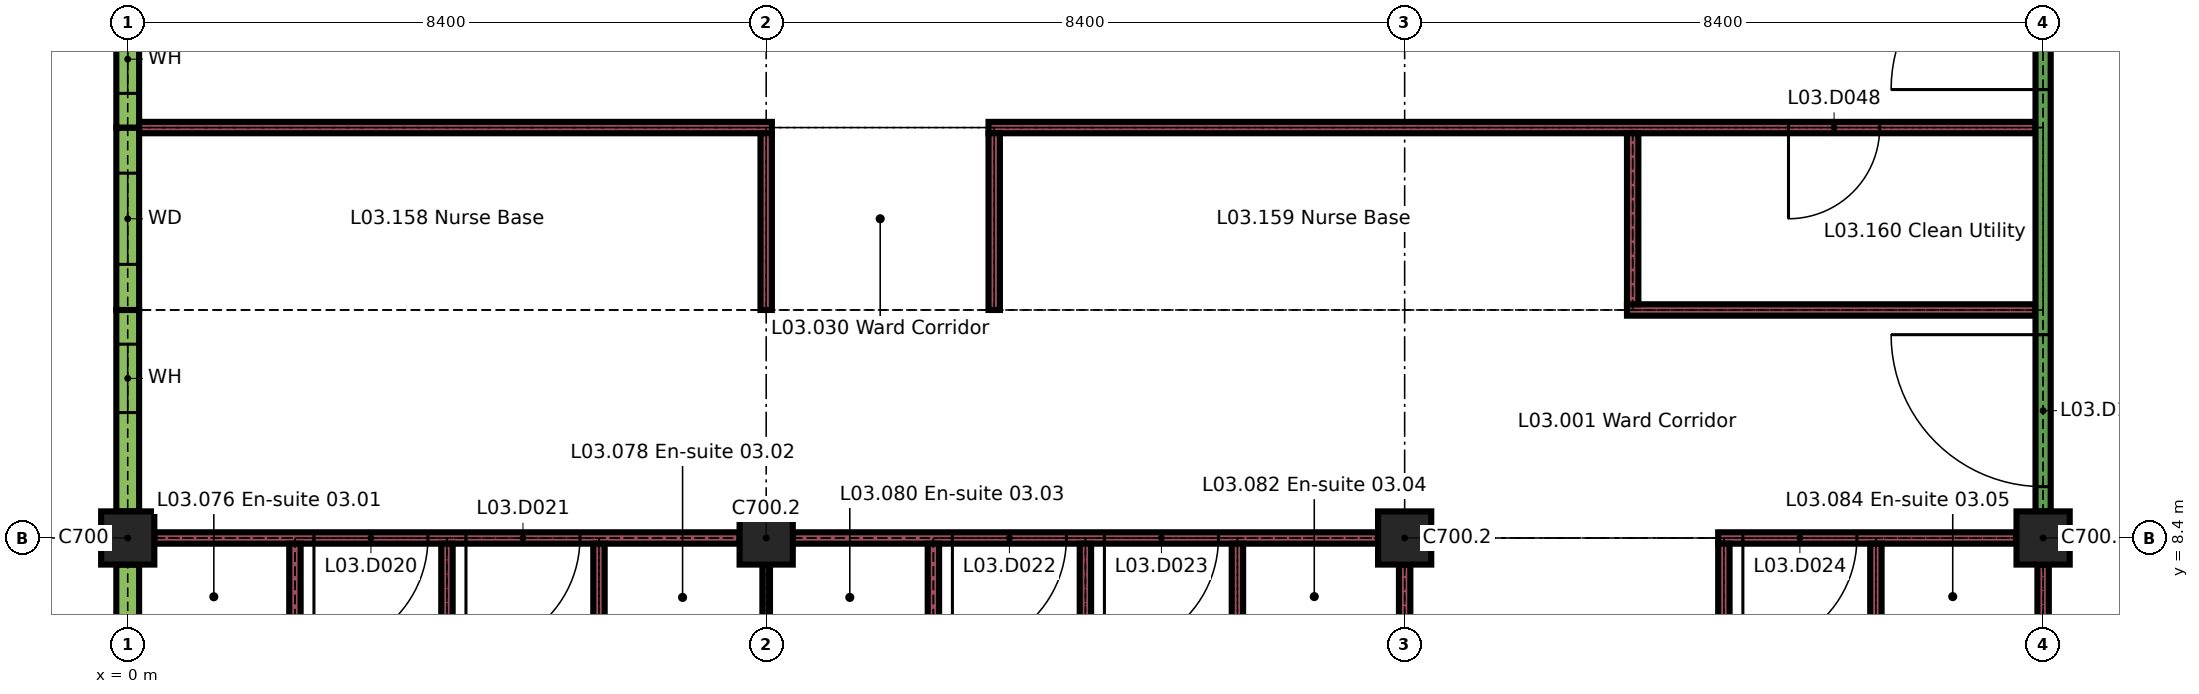
"""IFC4 building model, lengths in metres.
Left out: names, types, materials, properties, quantities, classifications, styles, units other than length and angle.
Written with IfcOpenShell. Run it as: python <this file> out.ifc"""

import sys

from ifc_helpers import new_model, si_unit, direction, frame, frame_2d, origin, origin_2d, place, context, subcontext, project, spatial, rectangle, extrude, element, fill, save


model = new_model("IFC4")
c1 = context("Model", 3, precision=1e-05, world=origin(), true_north=direction((0.0, 1.0)))
c2 = subcontext(c1, "Body", "Model", "MODEL_VIEW")
j1 = project(units=[si_unit("LENGTHUNIT", "METRE"), si_unit("PLANEANGLEUNIT", "RADIAN")], contexts=[c1])
p1 = place(None, origin())
s1 = spatial("IfcSite", under=j1, at=p1, CompositionType="ELEMENT")
p2 = place(p1, origin())
s2 = spatial("IfcBuilding", under=s1, at=p2, CompositionType="ELEMENT")
p3 = place(p2, frame((0.0, 0.0, 15.3)))
s3 = spatial("IfcBuildingStorey", under=s2, at=p3, CompositionType="ELEMENT", Elevation=15.3)
for number, where, z_axis, x_axis in (
    (1, (0.0, 8.4, 0.0), (0.0, 0.0, 1.0), (1.0, 0.0, 0.0)),
    (2, (8.4, 8.4, 0.0), (0.0, 0.0, 1.0), (1.0, 0.0, 0.0)),
    (3, (16.8, 8.4, 0.0), (0.0, 0.0, 1.0), (1.0, 0.0, 0.0)),
    (4, (25.2, 8.4, 0.0), (0.0, 0.0, 1.0), (1.0, 0.0, 0.0)),
):
    element("IfcColumn", number, at=place(p3, frame(where, z_axis=z_axis, x_axis=x_axis)), inside=s3, PredefinedType="COLUMN", context=c2, shape_type="SweptSolid", body=[
        extrude(rectangle(XDim=0.7, YDim=0.7, at=origin_2d()), origin(), (0.0, 0.0, 1.0), 3.26),
    ])
p4 = place(p3, frame((0.0, 6.0, 0.0), z_axis=(0.0, 0.0, 1.0), x_axis=(0.0, 1.0, 0.0)))
e5 = element("IfcWall", 5, at=p4, inside=s3, PredefinedType="SOLIDWALL", context=c2, shape_type="SweptSolid", body=[
    extrude(rectangle(XDim=2.05, YDim=0.3, at=frame_2d((1.025, 0.0))), origin(), (0.0, 0.0, 1.0), 2.96),
])
p5 = place(p3, frame((0.0, 8.75, 0.0), z_axis=(0.0, 0.0, 1.0), x_axis=(0.0, 1.0, 0.0)))
e6 = element("IfcWall", 6, at=p5, inside=s3, PredefinedType="SOLIDWALL", context=c2, shape_type="SweptSolid", body=[
    extrude(rectangle(XDim=2.65, YDim=0.3, at=frame_2d((1.325, 0.0))), origin(), (0.0, 0.0, 1.0), 2.96),
])
p6 = place(p5, frame((1.3, 0.0, 0.9)))
e7 = element("IfcOpeningElement", 7, at=p6, cuts=e6, PredefinedType="OPENING", context=c2, shape_type="SweptSolid", body=[
    extrude(rectangle(XDim=0.9, YDim=1.5, at=frame_2d((0.45, 0.75))), frame((0.0, 0.16, 0.0), z_axis=(0.0, -1.0, 0.0), x_axis=(1.0, 0.0, 0.0)), (0.0, 0.0, 1.0), 0.32),
])
p7 = place(p3, frame((0.0, 11.4, 0.0), z_axis=(0.0, 0.0, 1.0), x_axis=(0.0, 1.0, 0.0)))
e8 = element("IfcWall", 8, at=p7, inside=s3, PredefinedType="SOLIDWALL", context=c2, shape_type="SweptSolid", body=[
    extrude(rectangle(XDim=2.4, YDim=0.3, at=frame_2d((1.2, 0.0))), origin(), (0.0, 0.0, 1.0), 2.96),
])
p8 = place(p7, frame((0.6, 0.0, 0.9)))
e9 = element("IfcOpeningElement", 9, at=p8, cuts=e8, PredefinedType="OPENING", context=c2, shape_type="SweptSolid", body=[
    extrude(rectangle(XDim=1.2, YDim=1.5, at=frame_2d((0.6, 0.75))), frame((0.0, 0.16, 0.0), z_axis=(0.0, -1.0, 0.0), x_axis=(1.0, 0.0, 0.0)), (0.0, 0.0, 1.0), 0.32),
])
p9 = place(p3, frame((0.0, 13.8, 0.0), z_axis=(0.0, 0.0, 1.0), x_axis=(0.0, 1.0, 0.0)))
e10 = element("IfcWall", 10, at=p9, inside=s3, PredefinedType="SOLIDWALL", context=c2, shape_type="SweptSolid", body=[
    extrude(rectangle(XDim=3.0, YDim=0.3, at=frame_2d((1.5, 0.0))), origin(), (0.0, 0.0, 1.0), 2.96),
])
p10 = place(p9, frame((0.45, 0.0, 0.9)))
e11 = element("IfcOpeningElement", 11, at=p10, cuts=e10, PredefinedType="OPENING", context=c2, shape_type="SweptSolid", body=[
    extrude(rectangle(XDim=0.9, YDim=1.5, at=frame_2d((0.45, 0.75))), frame((0.0, 0.16, 0.0), z_axis=(0.0, -1.0, 0.0), x_axis=(1.0, 0.0, 0.0)), (0.0, 0.0, 1.0), 0.32),
])
p11 = place(p3, frame((0.35, 8.4, 0.0), z_axis=(0.0, 0.0, 1.0), x_axis=(1.0, 0.0, 0.0)))
e12 = element("IfcWall", 12, at=p11, inside=s3, PredefinedType="PARTITIONING", context=c2, shape_type="SweptSolid", body=[
    extrude(rectangle(XDim=7.7, YDim=0.15, at=frame_2d((3.85, 0.0))), origin(), (0.0, 0.0, 1.0), 3.26),
])
p12 = place(p11, frame((2.1, 0.0, 0.0)))
e13 = element("IfcOpeningElement", 13, at=p12, cuts=e12, PredefinedType="OPENING", context=c2, shape_type="SweptSolid", body=[
    extrude(rectangle(XDim=1.5, YDim=2.4, at=frame_2d((0.75, 1.2))), frame((0.0, 0.085, 0.0), z_axis=(0.0, -1.0, 0.0), x_axis=(1.0, 0.0, 0.0)), (0.0, 0.0, 1.0), 0.17),
])
p13 = place(p11, frame((4.1, 0.0, 0.0)))
e14 = element("IfcOpeningElement", 14, at=p13, cuts=e12, PredefinedType="OPENING", context=c2, shape_type="SweptSolid", body=[
    extrude(rectangle(XDim=1.5, YDim=2.4, at=frame_2d((0.75, 1.2))), frame((0.0, 0.085, 0.0), z_axis=(0.0, -1.0, 0.0), x_axis=(1.0, 0.0, 0.0)), (0.0, 0.0, 1.0), 0.17),
])
p14 = place(p3, frame((8.75, 8.4, 0.0), z_axis=(0.0, 0.0, 1.0), x_axis=(1.0, 0.0, 0.0)))
e15 = element("IfcWall", 15, at=p14, inside=s3, PredefinedType="PARTITIONING", context=c2, shape_type="SweptSolid", body=[
    extrude(rectangle(XDim=7.7, YDim=0.15, at=frame_2d((3.85, 0.0))), origin(), (0.0, 0.0, 1.0), 3.26),
])
p15 = place(p14, frame((2.1, 0.0, 0.0)))
e16 = element("IfcOpeningElement", 16, at=p15, cuts=e15, PredefinedType="OPENING", context=c2, shape_type="SweptSolid", body=[
    extrude(rectangle(XDim=1.5, YDim=2.4, at=frame_2d((0.75, 1.2))), frame((0.0, 0.085, 0.0), z_axis=(0.0, -1.0, 0.0), x_axis=(1.0, 0.0, 0.0)), (0.0, 0.0, 1.0), 0.17),
])
p16 = place(p14, frame((4.1, 0.0, 0.0)))
e17 = element("IfcOpeningElement", 17, at=p16, cuts=e15, PredefinedType="OPENING", context=c2, shape_type="SweptSolid", body=[
    extrude(rectangle(XDim=1.5, YDim=2.4, at=frame_2d((0.75, 1.2))), frame((0.0, 0.085, 0.0), z_axis=(0.0, -1.0, 0.0), x_axis=(1.0, 0.0, 0.0)), (0.0, 0.0, 1.0), 0.17),
])
p17 = place(p3, frame((20.925, 8.4, 0.0), z_axis=(0.0, 0.0, 1.0), x_axis=(1.0, 0.0, 0.0)))
e18 = element("IfcWall", 18, at=p17, inside=s3, PredefinedType="PARTITIONING", context=c2, shape_type="SweptSolid", body=[
    extrude(rectangle(XDim=3.925, YDim=0.15, at=frame_2d((1.962, 0.0))), origin(), (0.0, 0.0, 1.0), 3.26),
])
p18 = place(p17, frame((0.325, 0.0, 0.0)))
e19 = element("IfcOpeningElement", 19, at=p18, cuts=e18, PredefinedType="OPENING", context=c2, shape_type="SweptSolid", body=[
    extrude(rectangle(XDim=1.5, YDim=2.4, at=frame_2d((0.75, 1.2))), frame((0.0, 0.085, 0.0), z_axis=(0.0, -1.0, 0.0), x_axis=(1.0, 0.0, 0.0)), (0.0, 0.0, 1.0), 0.17),
])
p19 = place(p3, frame((19.725, 11.4, 0.0), z_axis=(0.0, 0.0, 1.0), x_axis=(1.0, 0.0, 0.0)))
e20 = element("IfcWall", 20, at=p19, inside=s3, PredefinedType="PARTITIONING", context=c2, shape_type="SweptSolid", body=[
    extrude(rectangle(XDim=5.375, YDim=0.15, at=frame_2d((2.688, 0.0))), origin(), (0.0, 0.0, 1.0), 3.26),
])
p20 = place(p3, frame((0.15, 13.8, 0.0), z_axis=(0.0, 0.0, 1.0), x_axis=(1.0, 0.0, 0.0)))
e21 = element("IfcWall", 21, at=p20, inside=s3, PredefinedType="PARTITIONING", context=c2, shape_type="SweptSolid", body=[
    extrude(rectangle(XDim=8.325, YDim=0.15, at=frame_2d((4.163, 0.0))), origin(), (0.0, 0.0, 1.0), 3.26),
])
p21 = place(p3, frame((11.325, 13.8, 0.0), z_axis=(0.0, 0.0, 1.0), x_axis=(1.0, 0.0, 0.0)))
e22 = element("IfcWall", 22, at=p21, inside=s3, PredefinedType="PARTITIONING", context=c2, shape_type="SweptSolid", body=[
    extrude(rectangle(XDim=13.775, YDim=0.15, at=frame_2d((6.888, 0.0))), origin(), (0.0, 0.0, 1.0), 3.26),
])
p22 = place(p21, frame((10.525, 0.0, 0.0)))
e23 = element("IfcOpeningElement", 23, at=p22, cuts=e22, PredefinedType="OPENING", context=c2, shape_type="SweptSolid", body=[
    extrude(rectangle(XDim=1.2, YDim=2.1, at=frame_2d((0.6, 1.05))), frame((0.0, 0.085, 0.0), z_axis=(0.0, -1.0, 0.0), x_axis=(1.0, 0.0, 0.0)), (0.0, 0.0, 1.0), 0.17),
])
p23 = place(p3, frame((2.2, 6.075, 0.0), z_axis=(0.0, 0.0, 1.0), x_axis=(0.0, 1.0, 0.0)))
e24 = element("IfcWall", 24, at=p23, inside=s3, PredefinedType="PARTITIONING", context=c2, shape_type="SweptSolid", body=[
    extrude(rectangle(XDim=2.25, YDim=0.15, at=frame_2d((1.125, 0.0))), origin(), (0.0, 0.0, 1.0), 3.26),
])
p24 = place(p3, frame((4.2, 0.15, 0.0), z_axis=(0.0, 0.0, 1.0), x_axis=(0.0, 1.0, 0.0)))
e25 = element("IfcWall", 25, at=p24, inside=s3, PredefinedType="PARTITIONING", context=c2, shape_type="SweptSolid", body=[
    extrude(rectangle(XDim=8.175, YDim=0.15, at=frame_2d((4.087, 0.0))), origin(), (0.0, 0.0, 1.0), 3.26),
])
p25 = place(p3, frame((6.2, 6.075, 0.0), z_axis=(0.0, 0.0, 1.0), x_axis=(0.0, 1.0, 0.0)))
e26 = element("IfcWall", 26, at=p25, inside=s3, PredefinedType="PARTITIONING", context=c2, shape_type="SweptSolid", body=[
    extrude(rectangle(XDim=2.25, YDim=0.15, at=frame_2d((1.125, 0.0))), origin(), (0.0, 0.0, 1.0), 3.26),
])
p26 = place(p3, frame((8.4, 6.075, 0.0), z_axis=(0.0, 0.0, 1.0), x_axis=(0.0, 1.0, 0.0)))
e27 = element("IfcWall", 27, at=p26, inside=s3, PredefinedType="PARTITIONING", context=c2, shape_type="SweptSolid", body=[
    extrude(rectangle(XDim=1.975, YDim=0.1, at=frame_2d((0.988, 0.0))), origin(), (0.0, 0.0, 1.0), 3.26),
])
p27 = place(p3, frame((8.4, 11.4, 0.0), z_axis=(0.0, 0.0, 1.0), x_axis=(0.0, 1.0, 0.0)))
e28 = element("IfcWall", 28, at=p27, inside=s3, PredefinedType="PARTITIONING", context=c2, shape_type="SweptSolid", body=[
    extrude(rectangle(XDim=2.325, YDim=0.15, at=frame_2d((1.163, 0.0))), origin(), (0.0, 0.0, 1.0), 3.26),
])
p28 = place(p3, frame((10.6, 6.075, 0.0), z_axis=(0.0, 0.0, 1.0), x_axis=(0.0, 1.0, 0.0)))
e29 = element("IfcWall", 29, at=p28, inside=s3, PredefinedType="PARTITIONING", context=c2, shape_type="SweptSolid", body=[
    extrude(rectangle(XDim=2.25, YDim=0.15, at=frame_2d((1.125, 0.0))), origin(), (0.0, 0.0, 1.0), 3.26),
])
p29 = place(p3, frame((11.4, 11.4, 0.0), z_axis=(0.0, 0.0, 1.0), x_axis=(0.0, 1.0, 0.0)))
e30 = element("IfcWall", 30, at=p29, inside=s3, PredefinedType="PARTITIONING", context=c2, shape_type="SweptSolid", body=[
    extrude(rectangle(XDim=2.325, YDim=0.15, at=frame_2d((1.163, 0.0))), origin(), (0.0, 0.0, 1.0), 3.26),
])
p30 = place(p3, frame((12.6, 0.15, 0.0), z_axis=(0.0, 0.0, 1.0), x_axis=(0.0, 1.0, 0.0)))
e31 = element("IfcWall", 31, at=p30, inside=s3, PredefinedType="PARTITIONING", context=c2, shape_type="SweptSolid", body=[
    extrude(rectangle(XDim=8.175, YDim=0.15, at=frame_2d((4.087, 0.0))), origin(), (0.0, 0.0, 1.0), 3.26),
])
p31 = place(p3, frame((14.6, 6.075, 0.0), z_axis=(0.0, 0.0, 1.0), x_axis=(0.0, 1.0, 0.0)))
e32 = element("IfcWall", 32, at=p31, inside=s3, PredefinedType="PARTITIONING", context=c2, shape_type="SweptSolid", body=[
    extrude(rectangle(XDim=2.25, YDim=0.15, at=frame_2d((1.125, 0.0))), origin(), (0.0, 0.0, 1.0), 3.26),
])
p32 = place(p3, frame((16.8, 0.35, 0.0), z_axis=(0.0, 0.0, 1.0), x_axis=(0.0, 1.0, 0.0)))
e33 = element("IfcWall", 33, at=p32, inside=s3, PredefinedType="PARTITIONING", context=c2, shape_type="SweptSolid", body=[
    extrude(rectangle(XDim=7.7, YDim=0.15, at=frame_2d((3.85, 0.0))), origin(), (0.0, 0.0, 1.0), 3.26),
])
p33 = place(p3, frame((19.8, 11.475, 0.0), z_axis=(0.0, 0.0, 1.0), x_axis=(0.0, 1.0, 0.0)))
e34 = element("IfcWall", 34, at=p33, inside=s3, PredefinedType="PARTITIONING", context=c2, shape_type="SweptSolid", body=[
    extrude(rectangle(XDim=2.25, YDim=0.15, at=frame_2d((1.125, 0.0))), origin(), (0.0, 0.0, 1.0), 3.26),
])
p34 = place(p3, frame((21.0, 0.15, 0.0), z_axis=(0.0, 0.0, 1.0), x_axis=(0.0, 1.0, 0.0)))
e35 = element("IfcWall", 35, at=p34, inside=s3, PredefinedType="PARTITIONING", context=c2, shape_type="SweptSolid", body=[
    extrude(rectangle(XDim=8.175, YDim=0.15, at=frame_2d((4.087, 0.0))), origin(), (0.0, 0.0, 1.0), 3.26),
])
p35 = place(p3, frame((23.0, 6.075, 0.0), z_axis=(0.0, 0.0, 1.0), x_axis=(0.0, 1.0, 0.0)))
e36 = element("IfcWall", 36, at=p35, inside=s3, PredefinedType="PARTITIONING", context=c2, shape_type="SweptSolid", body=[
    extrude(rectangle(XDim=2.25, YDim=0.15, at=frame_2d((1.125, 0.0))), origin(), (0.0, 0.0, 1.0), 3.26),
])
p36 = place(p3, frame((25.2, 0.35, 0.0), z_axis=(0.0, 0.0, 1.0), x_axis=(0.0, 1.0, 0.0)))
e37 = element("IfcWall", 37, at=p36, inside=s3, PredefinedType="PARTITIONING", context=c2, shape_type="SweptSolid", body=[
    extrude(rectangle(XDim=7.7, YDim=0.15, at=frame_2d((3.85, 0.0))), origin(), (0.0, 0.0, 1.0), 3.26),
])
p37 = place(p3, frame((25.2, 8.75, 0.0), z_axis=(0.0, 0.0, 1.0), x_axis=(0.0, 1.0, 0.0)))
e38 = element("IfcWall", 38, at=p37, inside=s3, PredefinedType="PARTITIONING", context=c2, shape_type="SweptSolid", body=[
    extrude(rectangle(XDim=12.85, YDim=0.2, at=frame_2d((6.425, 0.0))), origin(), (0.0, 0.0, 1.0), 3.26),
])
p38 = place(p37, frame((0.325, 0.0, 0.0)))
e39 = element("IfcOpeningElement", 39, at=p38, cuts=e38, PredefinedType="OPENING", context=c2, shape_type="SweptSolid", body=[
    extrude(rectangle(XDim=2.0, YDim=2.4, at=frame_2d((1.0, 1.2))), frame((0.0, 0.11, 0.0), z_axis=(0.0, -1.0, 0.0), x_axis=(1.0, 0.0, 0.0)), (0.0, 0.0, 1.0), 0.22),
])
p39 = place(p37, frame((5.55, 0.0, 0.0)))
e40 = element("IfcOpeningElement", 40, at=p39, cuts=e38, PredefinedType="OPENING", context=c2, shape_type="SweptSolid", body=[
    extrude(rectangle(XDim=2.0, YDim=2.4, at=frame_2d((1.0, 1.2))), frame((0.0, 0.11, 0.0), z_axis=(0.0, -1.0, 0.0), x_axis=(1.0, 0.0, 0.0)), (0.0, 0.0, 1.0), 0.22),
])
p40 = place(p6, origin())
e41 = element("IfcWindow", 41, at=p40, inside=s3, PartitioningType="SINGLE_PANEL", PredefinedType="WINDOW", context=c2, shape_type="SweptSolid", body=[
    extrude(rectangle(XDim=0.9, YDim=1.5, at=frame_2d((0.45, 0.75))), frame((0.0, 0.03, 0.0), z_axis=(0.0, -1.0, 0.0), x_axis=(1.0, 0.0, 0.0)), (0.0, 0.0, 1.0), 0.06),
])
fill(e7, e41)
p41 = place(p8, origin())
e42 = element("IfcWindow", 42, at=p41, inside=s3, PartitioningType="SINGLE_PANEL", PredefinedType="WINDOW", context=c2, shape_type="SweptSolid", body=[
    extrude(rectangle(XDim=1.2, YDim=1.5, at=frame_2d((0.6, 0.75))), frame((0.0, 0.03, 0.0), z_axis=(0.0, -1.0, 0.0), x_axis=(1.0, 0.0, 0.0)), (0.0, 0.0, 1.0), 0.06),
])
fill(e9, e42)
p42 = place(p10, origin())
e43 = element("IfcWindow", 43, at=p42, inside=s3, PartitioningType="SINGLE_PANEL", PredefinedType="WINDOW", context=c2, shape_type="SweptSolid", body=[
    extrude(rectangle(XDim=0.9, YDim=1.5, at=frame_2d((0.45, 0.75))), frame((0.0, 0.03, 0.0), z_axis=(0.0, -1.0, 0.0), x_axis=(1.0, 0.0, 0.0)), (0.0, 0.0, 1.0), 0.06),
])
fill(e11, e43)
p43 = place(p12, origin())
e44 = element("IfcDoor", 44, at=p43, inside=s3, OperationType="SINGLE_SWING_LEFT", PredefinedType="DOOR", context=c2, shape_type="SweptSolid", body=[
    extrude(rectangle(XDim=1.5, YDim=2.4, at=frame_2d((0.75, 1.2))), frame((0.0, 0.03, 0.0), z_axis=(0.0, -1.0, 0.0), x_axis=(1.0, 0.0, 0.0)), (0.0, 0.0, 1.0), 0.06),
])
fill(e13, e44)
p44 = place(p13, origin())
e45 = element("IfcDoor", 45, at=p44, inside=s3, OperationType="SINGLE_SWING_LEFT", PredefinedType="DOOR", context=c2, shape_type="SweptSolid", body=[
    extrude(rectangle(XDim=1.5, YDim=2.4, at=frame_2d((0.75, 1.2))), frame((0.0, 0.03, 0.0), z_axis=(0.0, -1.0, 0.0), x_axis=(1.0, 0.0, 0.0)), (0.0, 0.0, 1.0), 0.06),
])
fill(e14, e45)
p45 = place(p15, origin())
e46 = element("IfcDoor", 46, at=p45, inside=s3, OperationType="SINGLE_SWING_LEFT", PredefinedType="DOOR", context=c2, shape_type="SweptSolid", body=[
    extrude(rectangle(XDim=1.5, YDim=2.4, at=frame_2d((0.75, 1.2))), frame((0.0, 0.03, 0.0), z_axis=(0.0, -1.0, 0.0), x_axis=(1.0, 0.0, 0.0)), (0.0, 0.0, 1.0), 0.06),
])
fill(e16, e46)
p46 = place(p16, origin())
e47 = element("IfcDoor", 47, at=p46, inside=s3, OperationType="SINGLE_SWING_LEFT", PredefinedType="DOOR", context=c2, shape_type="SweptSolid", body=[
    extrude(rectangle(XDim=1.5, YDim=2.4, at=frame_2d((0.75, 1.2))), frame((0.0, 0.03, 0.0), z_axis=(0.0, -1.0, 0.0), x_axis=(1.0, 0.0, 0.0)), (0.0, 0.0, 1.0), 0.06),
])
fill(e17, e47)
p47 = place(p18, origin())
e48 = element("IfcDoor", 48, at=p47, inside=s3, OperationType="SINGLE_SWING_LEFT", PredefinedType="DOOR", context=c2, shape_type="SweptSolid", body=[
    extrude(rectangle(XDim=1.5, YDim=2.4, at=frame_2d((0.75, 1.2))), frame((0.0, 0.03, 0.0), z_axis=(0.0, -1.0, 0.0), x_axis=(1.0, 0.0, 0.0)), (0.0, 0.0, 1.0), 0.06),
])
fill(e19, e48)
p48 = place(p22, origin())
e49 = element("IfcDoor", 49, at=p48, inside=s3, OperationType="SINGLE_SWING_LEFT", PredefinedType="DOOR", context=c2, shape_type="SweptSolid", body=[
    extrude(rectangle(XDim=1.2, YDim=2.1, at=frame_2d((0.6, 1.05))), frame((0.0, 0.025, 0.0), z_axis=(0.0, -1.0, 0.0), x_axis=(1.0, 0.0, 0.0)), (0.0, 0.0, 1.0), 0.05),
])
fill(e23, e49)
p49 = place(p38, origin())
e50 = element("IfcDoor", 50, at=p49, inside=s3, OperationType="SINGLE_SWING_LEFT", PredefinedType="DOOR", context=c2, shape_type="SweptSolid", body=[
    extrude(rectangle(XDim=2.0, YDim=2.4, at=frame_2d((1.0, 1.2))), frame((0.0, 0.03, 0.0), z_axis=(0.0, -1.0, 0.0), x_axis=(1.0, 0.0, 0.0)), (0.0, 0.0, 1.0), 0.06),
])
fill(e39, e50)
p50 = place(p39, origin())
e51 = element("IfcDoor", 51, at=p50, inside=s3, OperationType="SINGLE_SWING_RIGHT", PredefinedType="DOOR", context=c2, shape_type="SweptSolid", body=[
    extrude(rectangle(XDim=2.0, YDim=2.4, at=frame_2d((1.0, 1.2))), frame((0.0, 0.03, 0.0), z_axis=(0.0, -1.0, 0.0), x_axis=(1.0, 0.0, 0.0)), (0.0, 0.0, 1.0), 0.06),
])
fill(e40, e51)
save(model, sys.argv[1])
